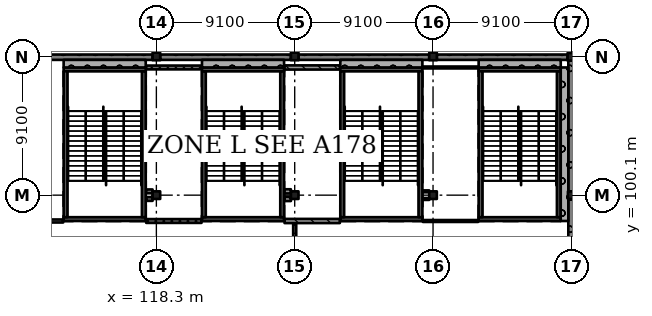
"""IFC4 building model, lengths in metres.
Left out: names, types, materials, properties, quantities, classifications, styles, units other than length and angle.
Written with IfcOpenShell. Run it as: python <this file> out.ifc"""

import sys

from ifc_helpers import new_model, si_unit, direction, frame, frame_2d, origin, origin_2d, place, context, subcontext, project, spatial, rectangle, extrude, element, fill, save


model = new_model("IFC4")
c1 = context("Model", 3, precision=1e-05, world=origin(), true_north=direction((0.0, 1.0)))
c2 = subcontext(c1, "Body", "Model", "MODEL_VIEW")
j1 = project(units=[si_unit("LENGTHUNIT", "METRE"), si_unit("PLANEANGLEUNIT", "RADIAN")], contexts=[c1])
p1 = place(None, origin())
s1 = spatial("IfcSite", under=j1, at=p1, CompositionType="ELEMENT")
p2 = place(p1, origin())
s2 = spatial("IfcBuilding", under=s1, at=p2, CompositionType="ELEMENT")
p3 = place(p2, frame((0.0, 0.0, 24.57)))
s3 = spatial("IfcBuildingStorey", under=s2, at=p3, CompositionType="ELEMENT", Elevation=24.57)
for number, where, z_axis, x_axis in (
    (1, (118.3, 100.1, 0.0), (0.0, 0.0, 1.0), (1.0, 0.0, 0.0)),
    (2, (118.3, 109.225, 0.0), (0.0, 0.0, 1.0), (1.0, 0.0, 0.0)),
    (3, (127.4, 100.1, 0.0), (0.0, 0.0, 1.0), (1.0, 0.0, 0.0)),
    (4, (127.4, 109.225, 0.0), (0.0, 0.0, 1.0), (1.0, 0.0, 0.0)),
    (5, (136.5, 100.1, 0.0), (0.0, 0.0, 1.0), (1.0, 0.0, 0.0)),
    (6, (136.5, 109.225, 0.0), (0.0, 0.0, 1.0), (1.0, 0.0, 0.0)),
    (7, (145.625, 100.1, 0.0), (0.0, 0.0, 1.0), (1.0, 0.0, 0.0)),
    (8, (145.6, 109.2, 0.0), (0.0, 0.0, 1.0), (1.0, 0.0, 0.0)),
):
    element("IfcColumn", number, at=place(p3, frame(where, z_axis=z_axis, x_axis=x_axis)), inside=s3, PredefinedType="COLUMN", context=c2, shape_type="SweptSolid", body=[
        extrude(rectangle(XDim=0.5, YDim=0.5, at=origin_2d()), origin(), (0.0, 0.0, 1.0), 4.55),
    ])
p4 = place(p3, frame((144.9, 98.525, 0.0), z_axis=(0.0, 0.0, 1.0), x_axis=(-1.0, 0.0, 0.0)))
e9 = element("IfcWall", 9, at=p4, inside=s3, PredefinedType="SHEAR", context=c2, shape_type="SweptSolid", body=[
    extrude(rectangle(XDim=5.4, YDim=0.25, at=frame_2d((2.7, 0.0))), origin(), (0.0, 0.0, 1.0), 4.55),
])
p5 = place(p4, frame((1.5, 0.0, 0.0)))
e10 = element("IfcOpeningElement", 10, at=p5, cuts=e9, PredefinedType="OPENING", context=c2, shape_type="SweptSolid", body=[
    extrude(rectangle(XDim=2.4, YDim=2.1, at=frame_2d((1.2, 1.05))), frame((0.0, 0.135, 0.0), z_axis=(0.0, -1.0, 0.0), x_axis=(1.0, 0.0, 0.0)), (0.0, 0.0, 1.0), 0.27),
])
p6 = place(p3, frame((144.9, 108.375, 0.0), z_axis=(0.0, 0.0, 1.0), x_axis=(-1.0, 0.0, 0.0)))
e11 = element("IfcWall", 11, at=p6, inside=s3, PredefinedType="SHEAR", context=c2, shape_type="SweptSolid", body=[
    extrude(rectangle(XDim=5.4, YDim=0.25, at=frame_2d((2.7, 0.0))), origin(), (0.0, 0.0, 1.0), 4.55),
])
for number, where, z_axis, x_axis in (
    (12, (139.625, 108.25, 0.0), (0.0, 0.0, 1.0), (0.0, -1.0, 0.0)),
    (13, (144.775, 108.25, 0.0), (0.0, 0.0, 1.0), (0.0, -1.0, 0.0)),
):
    element("IfcWall", number, at=place(p3, frame(where, z_axis=z_axis, x_axis=x_axis)), inside=s3, PredefinedType="SHEAR", context=c2, shape_type="SweptSolid", body=[
        extrude(rectangle(XDim=9.6, YDim=0.25, at=frame_2d((4.8, 0.0))), origin(), (0.0, 0.0, 1.0), 4.55),
    ])
p7 = place(p3, frame((135.8, 98.525, 0.0), z_axis=(0.0, 0.0, 1.0), x_axis=(-1.0, 0.0, 0.0)))
e14 = element("IfcWall", 14, at=p7, inside=s3, PredefinedType="SHEAR", context=c2, shape_type="SweptSolid", body=[
    extrude(rectangle(XDim=5.4, YDim=0.25, at=frame_2d((2.7, 0.0))), origin(), (0.0, 0.0, 1.0), 4.55),
])
p8 = place(p7, frame((1.5, 0.0, 0.0)))
e15 = element("IfcOpeningElement", 15, at=p8, cuts=e14, PredefinedType="OPENING", context=c2, shape_type="SweptSolid", body=[
    extrude(rectangle(XDim=2.4, YDim=2.1, at=frame_2d((1.2, 1.05))), frame((0.0, 0.135, 0.0), z_axis=(0.0, -1.0, 0.0), x_axis=(1.0, 0.0, 0.0)), (0.0, 0.0, 1.0), 0.27),
])
p9 = place(p3, frame((135.8, 108.375, 0.0), z_axis=(0.0, 0.0, 1.0), x_axis=(-1.0, 0.0, 0.0)))
e16 = element("IfcWall", 16, at=p9, inside=s3, PredefinedType="SHEAR", context=c2, shape_type="SweptSolid", body=[
    extrude(rectangle(XDim=5.4, YDim=0.25, at=frame_2d((2.7, 0.0))), origin(), (0.0, 0.0, 1.0), 4.55),
])
for number, where, z_axis, x_axis in (
    (17, (130.525, 108.25, 0.0), (0.0, 0.0, 1.0), (0.0, -1.0, 0.0)),
    (18, (135.675, 108.25, 0.0), (0.0, 0.0, 1.0), (0.0, -1.0, 0.0)),
):
    element("IfcWall", number, at=place(p3, frame(where, z_axis=z_axis, x_axis=x_axis)), inside=s3, PredefinedType="SHEAR", context=c2, shape_type="SweptSolid", body=[
        extrude(rectangle(XDim=9.6, YDim=0.25, at=frame_2d((4.8, 0.0))), origin(), (0.0, 0.0, 1.0), 4.55),
    ])
p10 = place(p3, frame((126.7, 98.525, 0.0), z_axis=(0.0, 0.0, 1.0), x_axis=(-1.0, 0.0, 0.0)))
e19 = element("IfcWall", 19, at=p10, inside=s3, PredefinedType="SHEAR", context=c2, shape_type="SweptSolid", body=[
    extrude(rectangle(XDim=5.4, YDim=0.25, at=frame_2d((2.7, 0.0))), origin(), (0.0, 0.0, 1.0), 4.55),
])
p11 = place(p10, frame((1.5, 0.0, 0.0)))
e20 = element("IfcOpeningElement", 20, at=p11, cuts=e19, PredefinedType="OPENING", context=c2, shape_type="SweptSolid", body=[
    extrude(rectangle(XDim=2.4, YDim=2.1, at=frame_2d((1.2, 1.05))), frame((0.0, 0.135, 0.0), z_axis=(0.0, -1.0, 0.0), x_axis=(1.0, 0.0, 0.0)), (0.0, 0.0, 1.0), 0.27),
])
p12 = place(p3, frame((126.7, 108.375, 0.0), z_axis=(0.0, 0.0, 1.0), x_axis=(-1.0, 0.0, 0.0)))
e21 = element("IfcWall", 21, at=p12, inside=s3, PredefinedType="SHEAR", context=c2, shape_type="SweptSolid", body=[
    extrude(rectangle(XDim=5.4, YDim=0.25, at=frame_2d((2.7, 0.0))), origin(), (0.0, 0.0, 1.0), 4.55),
])
for number, where, z_axis, x_axis in (
    (22, (121.425, 108.25, 0.0), (0.0, 0.0, 1.0), (0.0, -1.0, 0.0)),
    (23, (126.575, 108.25, 0.0), (0.0, 0.0, 1.0), (0.0, -1.0, 0.0)),
):
    element("IfcWall", number, at=place(p3, frame(where, z_axis=z_axis, x_axis=x_axis)), inside=s3, PredefinedType="SHEAR", context=c2, shape_type="SweptSolid", body=[
        extrude(rectangle(XDim=9.6, YDim=0.25, at=frame_2d((4.8, 0.0))), origin(), (0.0, 0.0, 1.0), 4.55),
    ])
p13 = place(p3, frame((117.6, 98.525, 0.0), z_axis=(0.0, 0.0, 1.0), x_axis=(-1.0, 0.0, 0.0)))
e24 = element("IfcWall", 24, at=p13, inside=s3, PredefinedType="SHEAR", context=c2, shape_type="SweptSolid", body=[
    extrude(rectangle(XDim=5.4, YDim=0.25, at=frame_2d((2.7, 0.0))), origin(), (0.0, 0.0, 1.0), 4.55),
])
p14 = place(p13, frame((1.5, 0.0, 0.0)))
e25 = element("IfcOpeningElement", 25, at=p14, cuts=e24, PredefinedType="OPENING", context=c2, shape_type="SweptSolid", body=[
    extrude(rectangle(XDim=2.4, YDim=2.1, at=frame_2d((1.2, 1.05))), frame((0.0, 0.135, 0.0), z_axis=(0.0, -1.0, 0.0), x_axis=(1.0, 0.0, 0.0)), (0.0, 0.0, 1.0), 0.27),
])
p15 = place(p3, frame((117.6, 108.375, 0.0), z_axis=(0.0, 0.0, 1.0), x_axis=(-1.0, 0.0, 0.0)))
e26 = element("IfcWall", 26, at=p15, inside=s3, PredefinedType="SHEAR", context=c2, shape_type="SweptSolid", body=[
    extrude(rectangle(XDim=5.4, YDim=0.25, at=frame_2d((2.7, 0.0))), origin(), (0.0, 0.0, 1.0), 4.55),
])
for number, where, z_axis, x_axis in (
    (27, (112.325, 108.25, 0.0), (0.0, 0.0, 1.0), (0.0, -1.0, 0.0)),
    (28, (117.475, 108.25, 0.0), (0.0, 0.0, 1.0), (0.0, -1.0, 0.0)),
):
    element("IfcWall", number, at=place(p3, frame(where, z_axis=z_axis, x_axis=x_axis)), inside=s3, PredefinedType="SHEAR", context=c2, shape_type="SweptSolid", body=[
        extrude(rectangle(XDim=9.6, YDim=0.25, at=frame_2d((4.8, 0.0))), origin(), (0.0, 0.0, 1.0), 4.55),
    ])
p16 = place(p3, frame((145.575, 91.25, 0.0), z_axis=(0.0, 0.0, 1.0), x_axis=(0.0, 1.0, 0.0)))
e29 = element("IfcWall", 29, at=p16, inside=s3, PredefinedType="SOLIDWALL", context=c2, shape_type="SweptSolid", body=[
    extrude(rectangle(XDim=8.6, YDim=0.35, at=frame_2d((4.3, 0.0))), origin(), (0.0, 0.0, 1.0), 3.6),
])
p17 = place(p3, frame((145.575, 100.35, 0.0), z_axis=(0.0, 0.0, 1.0), x_axis=(0.0, 1.0, 0.0)))
e30 = element("IfcWall", 30, at=p17, inside=s3, PredefinedType="SOLIDWALL", context=c2, shape_type="SweptSolid", body=[
    extrude(rectangle(XDim=8.6, YDim=0.35, at=frame_2d((4.3, 0.0))), origin(), (0.0, 0.0, 1.0), 3.6),
])
for number, where, z_axis, x_axis in (
    (31, (145.35, 109.175, 0.0), (0.0, 0.0, 1.0), (-1.0, 0.0, 0.0)),
    (32, (136.25, 109.175, 0.0), (0.0, 0.0, 1.0), (-1.0, 0.0, 0.0)),
):
    element("IfcWall", number, at=place(p3, frame(where, z_axis=z_axis, x_axis=x_axis)), inside=s3, PredefinedType="SOLIDWALL", context=c2, shape_type="SweptSolid", body=[
        extrude(rectangle(XDim=8.6, YDim=0.35, at=frame_2d((4.3, 0.0))), origin(), (0.0, 0.0, 1.0), 3.6),
    ])
p18 = place(p3, frame((127.15, 109.175, 0.0), z_axis=(0.0, 0.0, 1.0), x_axis=(-1.0, 0.0, 0.0)))
e33 = element("IfcWall", 33, at=p18, inside=s3, PredefinedType="SOLIDWALL", context=c2, shape_type="SweptSolid", body=[
    extrude(rectangle(XDim=8.6, YDim=0.35, at=frame_2d((4.3, 0.0))), origin(), (0.0, 0.0, 1.0), 3.6),
])
p19 = place(p3, frame((118.05, 109.175, 0.0), z_axis=(0.0, 0.0, 1.0), x_axis=(-1.0, 0.0, 0.0)))
e34 = element("IfcWall", 34, at=p19, inside=s3, PredefinedType="SOLIDWALL", context=c2, shape_type="SweptSolid", body=[
    extrude(rectangle(XDim=8.6, YDim=0.35, at=frame_2d((4.3, 0.0))), origin(), (0.0, 0.0, 1.0), 3.6),
])
p20 = place(p3, frame((139.5, 108.75, 0.0), z_axis=(0.0, 0.0, 1.0), x_axis=(1.0, 0.0, 0.0)))
e35 = element("IfcWall", 35, at=p20, inside=s3, PredefinedType="SOLIDWALL", context=c2, shape_type="SweptSolid", body=[
    extrude(rectangle(XDim=5.4, YDim=0.5, at=frame_2d((2.7, 0.0))), origin(), (0.0, 0.0, 1.0), 4.35),
])
p21 = place(p3, frame((145.15, 98.4, 0.0), z_axis=(0.0, 0.0, 1.0), x_axis=(0.0, 1.0, 0.0)))
e36 = element("IfcWall", 36, at=p21, inside=s3, PredefinedType="SOLIDWALL", context=c2, shape_type="SweptSolid", body=[
    extrude(rectangle(XDim=10.1, YDim=0.5, at=frame_2d((5.05, 0.0))), origin(), (0.0, 0.0, 1.0), 4.55),
])
p22 = place(p3, frame((130.4, 108.75, 0.0), z_axis=(0.0, 0.0, 1.0), x_axis=(1.0, 0.0, 0.0)))
e37 = element("IfcWall", 37, at=p22, inside=s3, PredefinedType="SOLIDWALL", context=c2, shape_type="SweptSolid", body=[
    extrude(rectangle(XDim=5.4, YDim=0.5, at=frame_2d((2.7, 0.0))), origin(), (0.0, 0.0, 1.0), 4.35),
])
p23 = place(p3, frame((121.3, 108.75, 0.0), z_axis=(0.0, 0.0, 1.0), x_axis=(1.0, 0.0, 0.0)))
e38 = element("IfcWall", 38, at=p23, inside=s3, PredefinedType="SOLIDWALL", context=c2, shape_type="SweptSolid", body=[
    extrude(rectangle(XDim=5.4, YDim=0.5, at=frame_2d((2.7, 0.0))), origin(), (0.0, 0.0, 1.0), 4.35),
])
p24 = place(p3, frame((112.2, 108.75, 0.0), z_axis=(0.0, 0.0, 1.0), x_axis=(1.0, 0.0, 0.0)))
e39 = element("IfcWall", 39, at=p24, inside=s3, PredefinedType="SOLIDWALL", context=c2, shape_type="SweptSolid", body=[
    extrude(rectangle(XDim=5.4, YDim=0.5, at=frame_2d((2.7, 0.0))), origin(), (0.0, 0.0, 1.0), 4.35),
])
p25 = place(p3, frame((109.35, 98.4, 0.0), z_axis=(0.0, 0.0, 1.0), x_axis=(1.0, 0.0, 0.0)))
e40 = element("IfcWall", 40, at=p25, inside=s3, PredefinedType="PARTITIONING", context=c2, shape_type="SweptSolid", body=[
    extrude(rectangle(XDim=2.82, YDim=0.2, at=frame_2d((1.41, 0.0))), origin(), (0.0, 0.0, 1.0), 4.35),
])
p26 = place(p25, frame((0.55, 0.0, 0.0)))
e41 = element("IfcOpeningElement", 41, at=p26, cuts=e40, PredefinedType="OPENING", context=c2, shape_type="SweptSolid", body=[
    extrude(rectangle(XDim=1.8, YDim=2.4, at=frame_2d((0.9, 1.2))), frame((0.0, 0.11, 0.0), z_axis=(0.0, -1.0, 0.0), x_axis=(1.0, 0.0, 0.0)), (0.0, 0.0, 1.0), 0.22),
])
p27 = place(p3, frame((117.63, 98.4, 0.0), z_axis=(0.0, 0.0, 1.0), x_axis=(1.0, 0.0, 0.0)))
e42 = element("IfcWall", 42, at=p27, inside=s3, PredefinedType="SOLIDWALL", context=c2, shape_type="SweptSolid", body=[
    extrude(rectangle(XDim=3.64, YDim=0.25, at=frame_2d((1.82, 0.0))), origin(), (0.0, 0.0, 1.0), 4.35),
])
p28 = place(p27, frame((1.35, 0.0, 0.0)))
e43 = element("IfcOpeningElement", 43, at=p28, cuts=e42, PredefinedType="OPENING", context=c2, shape_type="SweptSolid", body=[
    extrude(rectangle(XDim=1.0, YDim=2.1, at=frame_2d((0.5, 1.05))), frame((0.0, 0.135, 0.0), z_axis=(0.0, -1.0, 0.0), x_axis=(1.0, 0.0, 0.0)), (0.0, 0.0, 1.0), 0.27),
])
p29 = place(p3, frame((117.63, 99.85, 0.0), z_axis=(0.0, 0.0, 1.0), x_axis=(1.0, 0.0, 0.0)))
e44 = element("IfcWall", 44, at=p29, inside=s3, PredefinedType="SOLIDWALL", context=c2, shape_type="SweptSolid", body=[
    extrude(rectangle(XDim=0.42, YDim=0.25, at=frame_2d((0.21, 0.0))), origin(), (0.0, 0.0, 1.0), 4.35),
])
p30 = place(p3, frame((117.63, 108.5, 0.0), z_axis=(0.0, 0.0, 1.0), x_axis=(1.0, 0.0, 0.0)))
e45 = element("IfcWall", 45, at=p30, inside=s3, PredefinedType="SOLIDWALL", context=c2, shape_type="SweptSolid", body=[
    extrude(rectangle(XDim=3.64, YDim=0.25, at=frame_2d((1.82, 0.0))), origin(), (0.0, 0.0, 1.0), 4.35),
])
p31 = place(p3, frame((118.05, 100.35, 0.0), z_axis=(0.0, 0.0, 1.0), x_axis=(-1.0, 0.0, 0.0)))
e46 = element("IfcWall", 46, at=p31, inside=s3, PredefinedType="SOLIDWALL", context=c2, shape_type="SweptSolid", body=[
    extrude(rectangle(XDim=0.42, YDim=0.25, at=frame_2d((0.21, 0.0))), origin(), (0.0, 0.0, 1.0), 4.35),
])
p32 = place(p3, frame((126.73, 98.4, 0.0), z_axis=(0.0, 0.0, 1.0), x_axis=(1.0, 0.0, 0.0)))
e47 = element("IfcWall", 47, at=p32, inside=s3, PredefinedType="SOLIDWALL", context=c2, shape_type="SweptSolid", body=[
    extrude(rectangle(XDim=3.64, YDim=0.275, at=frame_2d((1.82, 0.0))), origin(), (0.0, 0.0, 1.0), 4.35),
])
p33 = place(p32, frame((1.52, 0.0, 0.0)))
e48 = element("IfcOpeningElement", 48, at=p33, cuts=e47, PredefinedType="OPENING", context=c2, shape_type="SweptSolid", body=[
    extrude(rectangle(XDim=1.2, YDim=2.4, at=frame_2d((0.6, 1.2))), frame((0.0, 0.147, 0.0), z_axis=(0.0, -1.0, 0.0), x_axis=(1.0, 0.0, 0.0)), (0.0, 0.0, 1.0), 0.295),
])
p34 = place(p3, frame((126.73, 99.85, 0.0), z_axis=(0.0, 0.0, 1.0), x_axis=(1.0, 0.0, 0.0)))
e49 = element("IfcWall", 49, at=p34, inside=s3, PredefinedType="SOLIDWALL", context=c2, shape_type="SweptSolid", body=[
    extrude(rectangle(XDim=0.42, YDim=0.275, at=frame_2d((0.21, 0.0))), origin(), (0.0, 0.0, 1.0), 4.35),
])
p35 = place(p3, frame((126.73, 108.5, 0.0), z_axis=(0.0, 0.0, 1.0), x_axis=(1.0, 0.0, 0.0)))
e50 = element("IfcWall", 50, at=p35, inside=s3, PredefinedType="SOLIDWALL", context=c2, shape_type="SweptSolid", body=[
    extrude(rectangle(XDim=3.64, YDim=0.275, at=frame_2d((1.82, 0.0))), origin(), (0.0, 0.0, 1.0), 4.35),
])
p36 = place(p3, frame((127.15, 100.35, 0.0), z_axis=(0.0, 0.0, 1.0), x_axis=(-1.0, 0.0, 0.0)))
e51 = element("IfcWall", 51, at=p36, inside=s3, PredefinedType="SOLIDWALL", context=c2, shape_type="SweptSolid", body=[
    extrude(rectangle(XDim=0.42, YDim=0.275, at=frame_2d((0.21, 0.0))), origin(), (0.0, 0.0, 1.0), 4.35),
])
p37 = place(p3, frame((127.4, 91.25, 0.0), z_axis=(0.0, 0.0, 1.0), x_axis=(0.0, 1.0, 0.0)))
e52 = element("IfcWall", 52, at=p37, inside=s3, PredefinedType="PARTITIONING", context=c2, shape_type="SweptSolid", body=[
    extrude(rectangle(XDim=7.012, YDim=0.2, at=frame_2d((3.506, 0.0))), origin(), (0.0, 0.0, 1.0), 3.6),
])
p38 = place(p37, frame((0.85, 0.0, 0.0)))
e53 = element("IfcOpeningElement", 53, at=p38, cuts=e52, PredefinedType="OPENING", context=c2, shape_type="SweptSolid", body=[
    extrude(rectangle(XDim=1.8, YDim=2.4, at=frame_2d((0.9, 1.2))), frame((0.0, 0.11, 0.0), z_axis=(0.0, -1.0, 0.0), x_axis=(1.0, 0.0, 0.0)), (0.0, 0.0, 1.0), 0.22),
])
p39 = place(p37, frame((4.35, 0.0, 0.0)))
e54 = element("IfcOpeningElement", 54, at=p39, cuts=e52, PredefinedType="OPENING", context=c2, shape_type="SweptSolid", body=[
    extrude(rectangle(XDim=1.8, YDim=2.4, at=frame_2d((0.9, 1.2))), frame((0.0, 0.11, 0.0), z_axis=(0.0, -1.0, 0.0), x_axis=(1.0, 0.0, 0.0)), (0.0, 0.0, 1.0), 0.22),
])
p40 = place(p3, frame((135.83, 98.4, 0.0), z_axis=(0.0, 0.0, 1.0), x_axis=(1.0, 0.0, 0.0)))
e55 = element("IfcWall", 55, at=p40, inside=s3, PredefinedType="PARTITIONING", context=c2, shape_type="SweptSolid", body=[
    extrude(rectangle(XDim=3.64, YDim=0.125, at=frame_2d((1.82, 0.0))), origin(), (0.0, 0.0, 1.0), 4.35),
])
p41 = place(p40, frame((1.35, 0.0, 0.0)))
e56 = element("IfcOpeningElement", 56, at=p41, cuts=e55, PredefinedType="OPENING", context=c2, shape_type="SweptSolid", body=[
    extrude(rectangle(XDim=0.9, YDim=2.1, at=frame_2d((0.45, 1.05))), frame((0.0, 0.073, 0.0), z_axis=(0.0, -1.0, 0.0), x_axis=(1.0, 0.0, 0.0)), (0.0, 0.0, 1.0), 0.145),
])
p42 = place(p3, frame((135.83, 99.85, 0.0), z_axis=(0.0, 0.0, 1.0), x_axis=(1.0, 0.0, 0.0)))
e57 = element("IfcWall", 57, at=p42, inside=s3, PredefinedType="PARTITIONING", context=c2, shape_type="SweptSolid", body=[
    extrude(rectangle(XDim=0.42, YDim=0.125, at=frame_2d((0.21, 0.0))), origin(), (0.0, 0.0, 1.0), 4.35),
])
p43 = place(p3, frame((135.83, 108.5, 0.0), z_axis=(0.0, 0.0, 1.0), x_axis=(1.0, 0.0, 0.0)))
e58 = element("IfcWall", 58, at=p43, inside=s3, PredefinedType="PARTITIONING", context=c2, shape_type="SweptSolid", body=[
    extrude(rectangle(XDim=3.64, YDim=0.125, at=frame_2d((1.82, 0.0))), origin(), (0.0, 0.0, 1.0), 4.35),
])
p44 = place(p3, frame((136.25, 100.35, 0.0), z_axis=(0.0, 0.0, 1.0), x_axis=(-1.0, 0.0, 0.0)))
e59 = element("IfcWall", 59, at=p44, inside=s3, PredefinedType="PARTITIONING", context=c2, shape_type="SweptSolid", body=[
    extrude(rectangle(XDim=0.42, YDim=0.125, at=frame_2d((0.21, 0.0))), origin(), (0.0, 0.0, 1.0), 4.35),
])
p45 = place(p41, origin())
e60 = element("IfcDoor", 60, at=p45, inside=s3, OperationType="SINGLE_SWING_RIGHT", PredefinedType="DOOR", context=c2, shape_type="SweptSolid", body=[
    extrude(rectangle(XDim=0.9, YDim=2.1, at=frame_2d((0.45, 1.05))), frame((0.0, 0.025, 0.0), z_axis=(0.0, -1.0, 0.0), x_axis=(1.0, 0.0, 0.0)), (0.0, 0.0, 1.0), 0.05),
])
fill(e56, e60)
p46 = place(p33, origin())
e61 = element("IfcDoor", 61, at=p46, inside=s3, OperationType="SINGLE_SWING_RIGHT", PredefinedType="DOOR", context=c2, shape_type="SweptSolid", body=[
    extrude(rectangle(XDim=1.2, YDim=2.4, at=frame_2d((0.6, 1.2))), frame((0.0, 0.025, 0.0), z_axis=(0.0, -1.0, 0.0), x_axis=(1.0, 0.0, 0.0)), (0.0, 0.0, 1.0), 0.05),
])
fill(e48, e61)
p47 = place(p28, origin())
e62 = element("IfcDoor", 62, at=p47, inside=s3, OperationType="SINGLE_SWING_LEFT", PredefinedType="DOOR", context=c2, shape_type="SweptSolid", body=[
    extrude(rectangle(XDim=1.0, YDim=2.1, at=frame_2d((0.5, 1.05))), frame((0.0, 0.025, 0.0), z_axis=(0.0, -1.0, 0.0), x_axis=(1.0, 0.0, 0.0)), (0.0, 0.0, 1.0), 0.05),
])
fill(e43, e62)
p48 = place(p39, origin())
e63 = element("IfcDoor", 63, at=p48, inside=s3, OperationType="DOUBLE_DOOR_SINGLE_SWING", PredefinedType="DOOR", context=c2, shape_type="SweptSolid", body=[
    extrude(rectangle(XDim=1.8, YDim=2.4, at=frame_2d((0.9, 1.2))), frame((0.0, 0.025, 0.0), z_axis=(0.0, -1.0, 0.0), x_axis=(1.0, 0.0, 0.0)), (0.0, 0.0, 1.0), 0.05),
])
fill(e54, e63)
p49 = place(p26, origin())
e64 = element("IfcDoor", 64, at=p49, inside=s3, OperationType="DOUBLE_DOOR_SINGLE_SWING", PredefinedType="DOOR", context=c2, shape_type="SweptSolid", body=[
    extrude(rectangle(XDim=1.8, YDim=2.4, at=frame_2d((0.9, 1.2))), frame((0.0, 0.025, 0.0), z_axis=(0.0, -1.0, 0.0), x_axis=(1.0, 0.0, 0.0)), (0.0, 0.0, 1.0), 0.05),
])
fill(e41, e64)
p50 = place(p5, origin())
e65 = element("IfcDoor", 65, at=p50, inside=s3, OperationType="DOUBLE_DOOR_SINGLE_SWING", PredefinedType="DOOR", context=c2, shape_type="SweptSolid", body=[
    extrude(rectangle(XDim=2.4, YDim=2.1, at=frame_2d((1.2, 1.05))), frame((0.0, 0.025, 0.0), z_axis=(0.0, -1.0, 0.0), x_axis=(1.0, 0.0, 0.0)), (0.0, 0.0, 1.0), 0.05),
])
fill(e10, e65)
p51 = place(p8, origin())
e66 = element("IfcDoor", 66, at=p51, inside=s3, OperationType="DOUBLE_DOOR_SINGLE_SWING", PredefinedType="DOOR", context=c2, shape_type="SweptSolid", body=[
    extrude(rectangle(XDim=2.4, YDim=2.1, at=frame_2d((1.2, 1.05))), frame((0.0, 0.025, 0.0), z_axis=(0.0, -1.0, 0.0), x_axis=(1.0, 0.0, 0.0)), (0.0, 0.0, 1.0), 0.05),
])
fill(e15, e66)
p52 = place(p11, origin())
e67 = element("IfcDoor", 67, at=p52, inside=s3, OperationType="DOUBLE_DOOR_SINGLE_SWING", PredefinedType="DOOR", context=c2, shape_type="SweptSolid", body=[
    extrude(rectangle(XDim=2.4, YDim=2.1, at=frame_2d((1.2, 1.05))), frame((0.0, 0.025, 0.0), z_axis=(0.0, -1.0, 0.0), x_axis=(1.0, 0.0, 0.0)), (0.0, 0.0, 1.0), 0.05),
])
fill(e20, e67)
p53 = place(p14, origin())
e68 = element("IfcDoor", 68, at=p53, inside=s3, OperationType="DOUBLE_DOOR_SINGLE_SWING", PredefinedType="DOOR", context=c2, shape_type="SweptSolid", body=[
    extrude(rectangle(XDim=2.4, YDim=2.1, at=frame_2d((1.2, 1.05))), frame((0.0, 0.025, 0.0), z_axis=(0.0, -1.0, 0.0), x_axis=(1.0, 0.0, 0.0)), (0.0, 0.0, 1.0), 0.05),
])
fill(e25, e68)
save(model, sys.argv[1])
